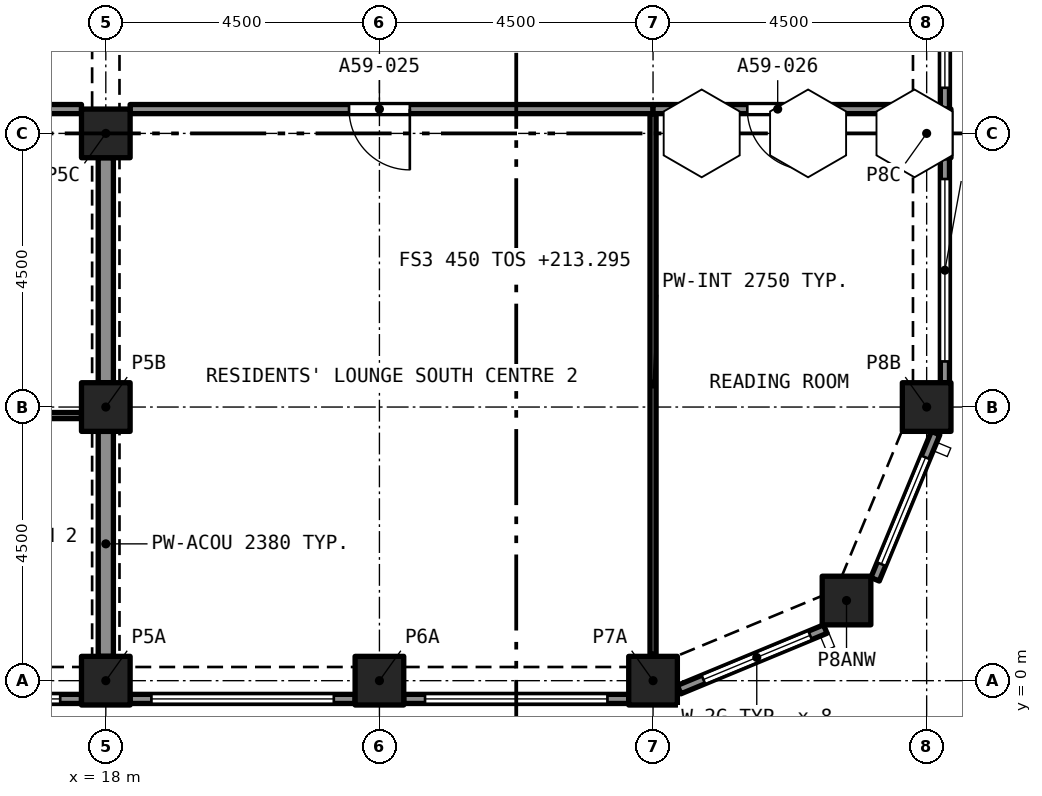
"""IFC4 building model, lengths in metres.
Left out: names, types, materials, properties, quantities, classifications, styles, units other than length and angle.
Written with IfcOpenShell. Run it as: python <this file> out.ifc"""

import sys

from ifc_helpers import new_model, si_unit, direction, frame, frame_2d, origin, origin_2d, place, context, subcontext, project, spatial, rectangle, extrude, element, fill, save


model = new_model("IFC4")
c1 = context("Model", 3, precision=1e-05, world=origin(), true_north=direction((0.0, 1.0)))
c2 = subcontext(c1, "Body", "Model", "MODEL_VIEW")
j1 = project(units=[si_unit("LENGTHUNIT", "METRE"), si_unit("PLANEANGLEUNIT", "RADIAN")], contexts=[c1])
p1 = place(None, origin())
s1 = spatial("IfcSite", under=j1, at=p1, CompositionType="ELEMENT")
p2 = place(p1, origin())
s2 = spatial("IfcBuilding", under=s1, at=p2, CompositionType="ELEMENT")
p3 = place(p2, frame((0.0, 0.0, 213.295)))
s3 = spatial("IfcBuildingStorey", under=s2, at=p3, CompositionType="ELEMENT", Elevation=213.295)
for number, where, z_axis, x_axis in (
    (1, (18.0, 0.0, 0.0), (0.0, 0.0, 1.0), (1.0, 0.0, 0.0)),
    (2, (22.5, 0.0, 0.0), (0.0, 0.0, 1.0), (1.0, 0.0, 0.0)),
    (3, (27.0, 0.0, 0.0), (0.0, 0.0, 1.0), (1.0, 0.0, 0.0)),
    (4, (30.182, 1.318, 0.0), (0.0, 0.0, 1.0), (1.0, 0.0, 0.0)),
    (5, (18.0, 4.5, 0.0), (0.0, 0.0, 1.0), (1.0, 0.0, 0.0)),
    (6, (31.5, 4.5, 0.0), (0.0, 0.0, 1.0), (1.0, 0.0, 0.0)),
    (7, (18.0, 9.0, 0.0), (0.0, 0.0, 1.0), (1.0, 0.0, 0.0)),
    (8, (31.5, 9.0, 0.0), (0.0, 0.0, 1.0), (1.0, 0.0, 0.0)),
):
    element("IfcColumn", number, at=place(p3, frame(where, z_axis=z_axis, x_axis=x_axis)), inside=s3, PredefinedType="COLUMN", context=c2, shape_type="SweptSolid", body=[
        extrude(rectangle(XDim=0.8, YDim=0.8, at=origin_2d()), origin(), (0.0, 0.0, 1.0), 3.2),
    ])
p4 = place(p3, frame((29.833, 0.849, 0.0), z_axis=(0.0, 0.0, 1.0), x_axis=(-0.923885342263, -0.382669406082, 0.0)))
e9 = element("IfcWall", 9, at=p4, inside=s3, PredefinedType="SOLIDWALL", context=c2, shape_type="SweptSolid", body=[
    extrude(rectangle(XDim=2.602, YDim=0.15, at=frame_2d((1.301, 0.0))), origin(), (0.0, 0.0, 1.0), 3.2),
])
p5 = place(p4, frame((0.27, 0.0, 0.45)))
e10 = element("IfcOpeningElement", 10, at=p5, cuts=e9, PredefinedType="OPENING", context=c2, shape_type="SweptSolid", body=[
    extrude(rectangle(XDim=1.9, YDim=1.95, at=frame_2d((0.95, 0.975))), frame((0.0, 0.085, 0.0), z_axis=(0.0, -1.0, 0.0), x_axis=(1.0, 0.0, 0.0)), (0.0, 0.0, 1.0), 0.17),
])
p6 = place(p3, frame((31.647, 4.071, 0.0), z_axis=(0.0, 0.0, 1.0), x_axis=(-0.382669406082, -0.923885342263, 0.0)))
e11 = element("IfcWall", 11, at=p6, inside=s3, PredefinedType="SOLIDWALL", context=c2, shape_type="SweptSolid", body=[
    extrude(rectangle(XDim=2.602, YDim=0.15, at=frame_2d((1.301, 0.0))), origin(), (0.0, 0.0, 1.0), 3.2),
])
p7 = place(p6, frame((0.432, 0.0, 0.45)))
e12 = element("IfcOpeningElement", 12, at=p7, cuts=e11, PredefinedType="OPENING", context=c2, shape_type="SweptSolid", body=[
    extrude(rectangle(XDim=1.9, YDim=1.95, at=frame_2d((0.95, 0.975))), frame((0.0, 0.085, 0.0), z_axis=(0.0, -1.0, 0.0), x_axis=(1.0, 0.0, 0.0)), (0.0, 0.0, 1.0), 0.17),
])
p8 = place(p3, frame((31.8, 8.6, 0.0), z_axis=(0.0, 0.0, 1.0), x_axis=(0.0, -1.0, 0.0)))
e13 = element("IfcWall", 13, at=p8, inside=s3, PredefinedType="SOLIDWALL", context=c2, shape_type="SweptSolid", body=[
    extrude(rectangle(XDim=3.7, YDim=0.15, at=frame_2d((1.85, 0.0))), origin(), (0.0, 0.0, 1.0), 3.2),
])
p9 = place(p8, frame((0.35, 0.0, 0.45)))
e14 = element("IfcOpeningElement", 14, at=p9, cuts=e13, PredefinedType="OPENING", context=c2, shape_type="SweptSolid", body=[
    extrude(rectangle(XDim=3.0, YDim=1.95, at=frame_2d((1.5, 0.975))), frame((0.0, 0.085, 0.0), z_axis=(0.0, -1.0, 0.0), x_axis=(1.0, 0.0, 0.0)), (0.0, 0.0, 1.0), 0.17),
])
p10 = place(p3, frame((31.8, 13.1, 0.0), z_axis=(0.0, 0.0, 1.0), x_axis=(0.0, -1.0, 0.0)))
e15 = element("IfcWall", 15, at=p10, inside=s3, PredefinedType="SOLIDWALL", context=c2, shape_type="SweptSolid", body=[
    extrude(rectangle(XDim=3.7, YDim=0.15, at=frame_2d((1.85, 0.0))), origin(), (0.0, 0.0, 1.0), 3.2),
])
p11 = place(p10, frame((0.35, 0.0, 0.45)))
e16 = element("IfcOpeningElement", 16, at=p11, cuts=e15, PredefinedType="OPENING", context=c2, shape_type="SweptSolid", body=[
    extrude(rectangle(XDim=3.0, YDim=1.95, at=frame_2d((1.5, 0.975))), frame((0.0, 0.085, 0.0), z_axis=(0.0, -1.0, 0.0), x_axis=(1.0, 0.0, 0.0)), (0.0, 0.0, 1.0), 0.17),
])
p12 = place(p3, frame((17.6, -0.3, 0.0), z_axis=(0.0, 0.0, 1.0), x_axis=(-1.0, 0.0, 0.0)))
e17 = element("IfcWall", 17, at=p12, inside=s3, PredefinedType="SOLIDWALL", context=c2, shape_type="SweptSolid", body=[
    extrude(rectangle(XDim=3.7, YDim=0.15, at=frame_2d((1.85, 0.0))), origin(), (0.0, 0.0, 1.0), 3.2),
])
p13 = place(p12, frame((0.35, 0.0, 0.45)))
e18 = element("IfcOpeningElement", 18, at=p13, cuts=e17, PredefinedType="OPENING", context=c2, shape_type="SweptSolid", body=[
    extrude(rectangle(XDim=3.0, YDim=1.95, at=frame_2d((1.5, 0.975))), frame((0.0, 0.085, 0.0), z_axis=(0.0, -1.0, 0.0), x_axis=(1.0, 0.0, 0.0)), (0.0, 0.0, 1.0), 0.17),
])
p14 = place(p3, frame((22.1, -0.3, 0.0), z_axis=(0.0, 0.0, 1.0), x_axis=(-1.0, 0.0, 0.0)))
e19 = element("IfcWall", 19, at=p14, inside=s3, PredefinedType="SOLIDWALL", context=c2, shape_type="SweptSolid", body=[
    extrude(rectangle(XDim=3.7, YDim=0.15, at=frame_2d((1.85, 0.0))), origin(), (0.0, 0.0, 1.0), 3.2),
])
p15 = place(p14, frame((0.35, 0.0, 0.45)))
e20 = element("IfcOpeningElement", 20, at=p15, cuts=e19, PredefinedType="OPENING", context=c2, shape_type="SweptSolid", body=[
    extrude(rectangle(XDim=3.0, YDim=1.95, at=frame_2d((1.5, 0.975))), frame((0.0, 0.085, 0.0), z_axis=(0.0, -1.0, 0.0), x_axis=(1.0, 0.0, 0.0)), (0.0, 0.0, 1.0), 0.17),
])
p16 = place(p3, frame((26.6, -0.3, 0.0), z_axis=(0.0, 0.0, 1.0), x_axis=(-1.0, 0.0, 0.0)))
e21 = element("IfcWall", 21, at=p16, inside=s3, PredefinedType="SOLIDWALL", context=c2, shape_type="SweptSolid", body=[
    extrude(rectangle(XDim=3.7, YDim=0.15, at=frame_2d((1.85, 0.0))), origin(), (0.0, 0.0, 1.0), 3.2),
])
p17 = place(p16, frame((0.35, 0.0, 0.45)))
e22 = element("IfcOpeningElement", 22, at=p17, cuts=e21, PredefinedType="OPENING", context=c2, shape_type="SweptSolid", body=[
    extrude(rectangle(XDim=3.0, YDim=1.95, at=frame_2d((1.5, 0.975))), frame((0.0, 0.085, 0.0), z_axis=(0.0, -1.0, 0.0), x_axis=(1.0, 0.0, 0.0)), (0.0, 0.0, 1.0), 0.17),
])
p18 = place(p3, frame((17.6, 4.36, 0.0), z_axis=(0.0, 0.0, 1.0), x_axis=(-1.0, 0.0, 0.0)))
e23 = element("IfcWall", 23, at=p18, inside=s3, PredefinedType="PARTITIONING", context=c2, shape_type="SweptSolid", body=[
    extrude(rectangle(XDim=4.1, YDim=0.1, at=frame_2d((2.05, 0.0))), origin(), (0.0, 0.0, 1.0), 2.9),
])
p19 = place(p18, frame((1.4, 0.0, 0.0)))
e24 = element("IfcOpeningElement", 24, at=p19, cuts=e23, PredefinedType="OPENING", context=c2, shape_type="SweptSolid", body=[
    extrude(rectangle(XDim=0.9, YDim=2.1, at=frame_2d((0.45, 1.05))), frame((0.0, 0.06, 0.0), z_axis=(0.0, -1.0, 0.0), x_axis=(1.0, 0.0, 0.0)), (0.0, 0.0, 1.0), 0.12),
])
for number, where, z_axis, x_axis in (
    (25, (18.0, 0.4, 0.0), (0.0, 0.0, 1.0), (0.0, 1.0, 0.0)),
    (26, (18.0, 4.9, 0.0), (0.0, 0.0, 1.0), (0.0, 1.0, 0.0)),
):
    element("IfcWall", number, at=place(p3, frame(where, z_axis=z_axis, x_axis=x_axis)), inside=s3, PredefinedType="PARTITIONING", context=c2, shape_type="SweptSolid", body=[
        extrude(rectangle(XDim=3.7, YDim=0.25, at=frame_2d((1.85, 0.0))), origin(), (0.0, 0.0, 1.0), 2.38),
    ])
p20 = place(p3, frame((17.6, 9.4, 0.0), z_axis=(0.0, 0.0, 1.0), x_axis=(-1.0, 0.0, 0.0)))
e27 = element("IfcWall", 27, at=p20, inside=s3, PredefinedType="PARTITIONING", context=c2, shape_type="SweptSolid", body=[
    extrude(rectangle(XDim=2.65, YDim=0.15, at=frame_2d((1.325, 0.0))), origin(), (0.0, 0.0, 1.0), 2.9),
])
p21 = place(p20, frame((1.25, 0.0, 0.0)))
e28 = element("IfcOpeningElement", 28, at=p21, cuts=e27, PredefinedType="OPENING", context=c2, shape_type="SweptSolid", body=[
    extrude(rectangle(XDim=1.2, YDim=2.4, at=frame_2d((0.6, 1.2))), frame((0.0, 0.085, 0.0), z_axis=(0.0, -1.0, 0.0), x_axis=(1.0, 0.0, 0.0)), (0.0, 0.0, 1.0), 0.17),
])
p22 = place(p3, frame((27.0, 0.433, 0.0), z_axis=(0.0, 0.0, 1.0), x_axis=(0.0, 1.0, 0.0)))
e29 = element("IfcWall", 29, at=p22, inside=s3, PredefinedType="PARTITIONING", context=c2, shape_type="SweptSolid", body=[
    extrude(rectangle(XDim=8.892, YDim=0.1, at=frame_2d((4.446, 0.0))), origin(), (0.0, 0.0, 1.0), 2.75),
])
p23 = place(p3, frame((27.0, 9.4, 0.0), z_axis=(0.0, 0.0, 1.0), x_axis=(-1.0, 0.0, 0.0)))
e30 = element("IfcWall", 30, at=p23, inside=s3, PredefinedType="PARTITIONING", context=c2, shape_type="SweptSolid", body=[
    extrude(rectangle(XDim=8.6, YDim=0.15, at=frame_2d((4.3, 0.0))), origin(), (0.0, 0.0, 1.0), 2.75),
])
p24 = place(p23, frame((4.0, 0.0, 0.0)))
e31 = element("IfcOpeningElement", 31, at=p24, cuts=e30, PredefinedType="OPENING", context=c2, shape_type="SweptSolid", body=[
    extrude(rectangle(XDim=1.0, YDim=2.1, at=frame_2d((0.5, 1.05))), frame((0.0, 0.085, 0.0), z_axis=(0.0, -1.0, 0.0), x_axis=(1.0, 0.0, 0.0)), (0.0, 0.0, 1.0), 0.17),
])
p25 = place(p3, frame((31.1, 9.4, 0.0), z_axis=(0.0, 0.0, 1.0), x_axis=(-1.0, 0.0, 0.0)))
e32 = element("IfcWall", 32, at=p25, inside=s3, PredefinedType="PARTITIONING", context=c2, shape_type="SweptSolid", body=[
    extrude(rectangle(XDim=4.1, YDim=0.15, at=frame_2d((2.05, 0.0))), origin(), (0.0, 0.0, 1.0), 2.75),
])
p26 = place(p25, frame((1.55, 0.0, 0.0)))
e33 = element("IfcOpeningElement", 33, at=p26, cuts=e32, PredefinedType="OPENING", context=c2, shape_type="SweptSolid", body=[
    extrude(rectangle(XDim=1.0, YDim=2.1, at=frame_2d((0.5, 1.05))), frame((0.0, 0.085, 0.0), z_axis=(0.0, -1.0, 0.0), x_axis=(1.0, 0.0, 0.0)), (0.0, 0.0, 1.0), 0.17),
])
p27 = place(p5, origin())
e34 = element("IfcWindow", 34, at=p27, inside=s3, PartitioningType="SINGLE_PANEL", PredefinedType="WINDOW", context=c2, shape_type="SweptSolid", body=[
    extrude(rectangle(XDim=1.9, YDim=1.95, at=frame_2d((0.95, 0.975))), frame((0.0, 0.03, 0.0), z_axis=(0.0, -1.0, 0.0), x_axis=(1.0, 0.0, 0.0)), (0.0, 0.0, 1.0), 0.06),
])
fill(e10, e34)
p28 = place(p7, origin())
e35 = element("IfcWindow", 35, at=p28, inside=s3, PartitioningType="SINGLE_PANEL", PredefinedType="WINDOW", context=c2, shape_type="SweptSolid", body=[
    extrude(rectangle(XDim=1.9, YDim=1.95, at=frame_2d((0.95, 0.975))), frame((0.0, 0.03, 0.0), z_axis=(0.0, -1.0, 0.0), x_axis=(1.0, 0.0, 0.0)), (0.0, 0.0, 1.0), 0.06),
])
fill(e12, e35)
p29 = place(p9, origin())
e36 = element("IfcWindow", 36, at=p29, inside=s3, PartitioningType="SINGLE_PANEL", PredefinedType="WINDOW", context=c2, shape_type="SweptSolid", body=[
    extrude(rectangle(XDim=3.0, YDim=1.95, at=frame_2d((1.5, 0.975))), frame((0.0, 0.03, 0.0), z_axis=(0.0, -1.0, 0.0), x_axis=(1.0, 0.0, 0.0)), (0.0, 0.0, 1.0), 0.06),
])
fill(e14, e36)
p30 = place(p11, origin())
e37 = element("IfcWindow", 37, at=p30, inside=s3, PartitioningType="SINGLE_PANEL", PredefinedType="WINDOW", context=c2, shape_type="SweptSolid", body=[
    extrude(rectangle(XDim=3.0, YDim=1.95, at=frame_2d((1.5, 0.975))), frame((0.0, 0.03, 0.0), z_axis=(0.0, -1.0, 0.0), x_axis=(1.0, 0.0, 0.0)), (0.0, 0.0, 1.0), 0.06),
])
fill(e16, e37)
p31 = place(p13, origin())
e38 = element("IfcWindow", 38, at=p31, inside=s3, PartitioningType="SINGLE_PANEL", PredefinedType="WINDOW", context=c2, shape_type="SweptSolid", body=[
    extrude(rectangle(XDim=3.0, YDim=1.95, at=frame_2d((1.5, 0.975))), frame((0.0, 0.03, 0.0), z_axis=(0.0, -1.0, 0.0), x_axis=(1.0, 0.0, 0.0)), (0.0, 0.0, 1.0), 0.06),
])
fill(e18, e38)
p32 = place(p15, origin())
e39 = element("IfcWindow", 39, at=p32, inside=s3, PartitioningType="SINGLE_PANEL", PredefinedType="WINDOW", context=c2, shape_type="SweptSolid", body=[
    extrude(rectangle(XDim=3.0, YDim=1.95, at=frame_2d((1.5, 0.975))), frame((0.0, 0.03, 0.0), z_axis=(0.0, -1.0, 0.0), x_axis=(1.0, 0.0, 0.0)), (0.0, 0.0, 1.0), 0.06),
])
fill(e20, e39)
p33 = place(p17, origin())
e40 = element("IfcWindow", 40, at=p33, inside=s3, PartitioningType="SINGLE_PANEL", PredefinedType="WINDOW", context=c2, shape_type="SweptSolid", body=[
    extrude(rectangle(XDim=3.0, YDim=1.95, at=frame_2d((1.5, 0.975))), frame((0.0, 0.03, 0.0), z_axis=(0.0, -1.0, 0.0), x_axis=(1.0, 0.0, 0.0)), (0.0, 0.0, 1.0), 0.06),
])
fill(e22, e40)
p34 = place(p24, origin())
e41 = element("IfcDoor", 41, at=p34, inside=s3, OperationType="SINGLE_SWING_RIGHT", PredefinedType="DOOR", context=c2, shape_type="SweptSolid", body=[
    extrude(rectangle(XDim=1.0, YDim=2.1, at=frame_2d((0.5, 1.05))), frame((0.0, 0.025, 0.0), z_axis=(0.0, -1.0, 0.0), x_axis=(1.0, 0.0, 0.0)), (0.0, 0.0, 1.0), 0.05),
])
fill(e31, e41)
p35 = place(p26, origin())
e42 = element("IfcDoor", 42, at=p35, inside=s3, OperationType="SINGLE_SWING_RIGHT", PredefinedType="DOOR", context=c2, shape_type="SweptSolid", body=[
    extrude(rectangle(XDim=1.0, YDim=2.1, at=frame_2d((0.5, 1.05))), frame((0.0, 0.025, 0.0), z_axis=(0.0, -1.0, 0.0), x_axis=(1.0, 0.0, 0.0)), (0.0, 0.0, 1.0), 0.05),
])
fill(e33, e42)
save(model, sys.argv[1])
